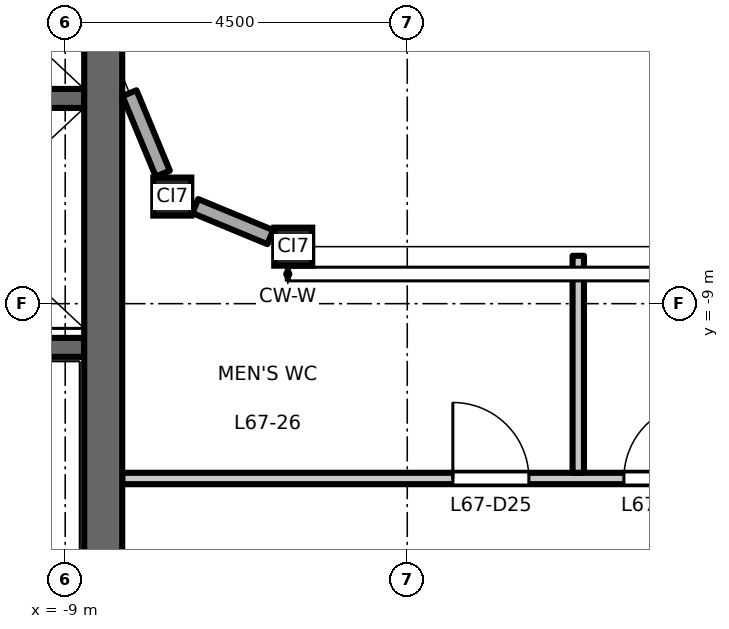
"""IFC4 building model, lengths in metres.
Left out: names, types, materials, properties, quantities, classifications, styles, units other than length and angle.
Written with IfcOpenShell. Run it as: python <this file> out.ifc"""

import sys

from ifc_helpers import new_model, si_unit, direction, frame, frame_2d, origin, origin_2d, place, context, subcontext, project, spatial, rectangle, hollow_rectangle, extrude, element, fill, save


model = new_model("IFC4")
c1 = context("Model", 3, precision=1e-05, world=origin(), true_north=direction((0.0, 1.0)))
c2 = subcontext(c1, "Body", "Model", "MODEL_VIEW")
j1 = project(units=[si_unit("LENGTHUNIT", "METRE"), si_unit("PLANEANGLEUNIT", "RADIAN")], contexts=[c1])
p1 = place(None, origin())
s1 = spatial("IfcSite", under=j1, at=p1, CompositionType="ELEMENT")
p2 = place(p1, origin())
s2 = spatial("IfcBuilding", under=s1, at=p2, CompositionType="ELEMENT")
p3 = place(p2, frame((0.0, 0.0, 312.2)))
s3 = spatial("IfcBuildingStorey", under=s2, at=p3, CompositionType="ELEMENT", Elevation=312.2)
for number, where, z_axis, x_axis in (
    (1, (-7.591, -7.591, 0.0), (0.0, 0.0, 1.0), (1.0, 0.0, 0.0)),
    (2, (-6.0, -8.25, 0.0), (0.0, 0.0, 1.0), (1.0, 0.0, 0.0)),
):
    element("IfcColumn", number, at=place(p3, frame(where, z_axis=z_axis, x_axis=x_axis)), inside=s3, PredefinedType="COLUMN", context=c2, shape_type="SweptSolid", body=[
        extrude(hollow_rectangle(XDim=0.5, YDim=0.5, WallThickness=0.025, at=origin_2d()), origin(), (0.0, 0.0, 1.0), 4.5),
    ])
p4 = place(p3, frame((-8.75, -6.3, 0.0), z_axis=(0.0, 0.0, 1.0), x_axis=(-1.0, 0.0, 0.0)))
e3 = element("IfcWall", 3, at=p4, inside=s3, PredefinedType="SHEAR", context=c2, shape_type="SweptSolid", body=[
    extrude(rectangle(XDim=3.1, YDim=0.25, at=frame_2d((1.55, 0.0))), origin(), (0.0, 0.0, 1.0), 4.35),
])
p5 = place(p3, frame((-8.75, -9.575, 0.0), z_axis=(0.0, 0.0, 1.0), x_axis=(-1.0, 0.0, 0.0)))
e4 = element("IfcWall", 4, at=p5, inside=s3, PredefinedType="SHEAR", context=c2, shape_type="SweptSolid", body=[
    extrude(rectangle(XDim=8.0, YDim=0.25, at=frame_2d((4.0, 0.0))), origin(), (0.0, 0.0, 1.0), 4.35),
])
p6 = place(p5, frame((6.65, 0.0, 0.0)))
e5 = element("IfcOpeningElement", 5, at=p6, cuts=e4, PredefinedType="OPENING", context=c2, shape_type="SweptSolid", body=[
    extrude(rectangle(XDim=1.1, YDim=2.1, at=frame_2d((0.55, 1.05))), frame((0.0, 0.135, 0.0), z_axis=(0.0, -1.0, 0.0), x_axis=(1.0, 0.0, 0.0)), (0.0, 0.0, 1.0), 0.27),
])
p7 = place(p3, frame((-8.5, -13.0, 0.0), z_axis=(0.0, 0.0, 1.0), x_axis=(0.0, 1.0, 0.0)))
e6 = element("IfcWall", 6, at=p7, inside=s3, PredefinedType="SHEAR", context=c2, shape_type="SweptSolid", body=[
    extrude(rectangle(XDim=26.0, YDim=0.5, at=frame_2d((13.0, 0.0))), origin(), (0.0, 0.0, 1.0), 4.35),
])
p8 = place(p3, frame((-8.154, -6.231, 0.0), z_axis=(0.0, 0.0, 1.0), x_axis=(0.382571404949, -0.923925927829, 0.0)))
e7 = element("IfcWall", 7, at=p8, inside=s3, PredefinedType="STANDARD", context=c2, shape_type="SweptSolid", body=[
    extrude(rectangle(XDim=1.146, YDim=0.2, at=frame_2d((0.573, 0.0))), origin(), (0.0, 0.0, 1.0), 4.01),
])
p9 = place(p3, frame((-7.289, -7.716, 0.0), z_axis=(0.0, 0.0, 1.0), x_axis=(0.923919409248, -0.382587147216, 0.0)))
e8 = element("IfcWall", 8, at=p9, inside=s3, PredefinedType="STANDARD", context=c2, shape_type="SweptSolid", body=[
    extrude(rectangle(XDim=1.069, YDim=0.2, at=frame_2d((0.534, 0.0))), origin(), (0.0, 0.0, 1.0), 4.01),
])
p10 = place(p3, frame((-8.25, -11.3, 0.0), z_axis=(0.0, 0.0, 1.0), x_axis=(1.0, 0.0, 0.0)))
e9 = element("IfcWall", 9, at=p10, inside=s3, PredefinedType="PARTITIONING", context=c2, shape_type="SweptSolid", body=[
    extrude(rectangle(XDim=14.79, YDim=0.15, at=frame_2d((7.395, 0.0))), origin(), (0.0, 0.0, 1.0), 4.35),
])
p11 = place(p10, frame((4.35, 0.0, 0.0)))
e10 = element("IfcOpeningElement", 10, at=p11, cuts=e9, PredefinedType="OPENING", context=c2, shape_type="SweptSolid", body=[
    extrude(rectangle(XDim=1.0, YDim=2.1, at=frame_2d((0.5, 1.05))), frame((0.0, 0.085, 0.0), z_axis=(0.0, -1.0, 0.0), x_axis=(1.0, 0.0, 0.0)), (0.0, 0.0, 1.0), 0.17),
])
p12 = place(p10, frame((6.6, 0.0, 0.0)))
e11 = element("IfcOpeningElement", 11, at=p12, cuts=e9, PredefinedType="OPENING", context=c2, shape_type="SweptSolid", body=[
    extrude(rectangle(XDim=1.0, YDim=2.1, at=frame_2d((0.5, 1.05))), frame((0.0, 0.085, 0.0), z_axis=(0.0, -1.0, 0.0), x_axis=(1.0, 0.0, 0.0)), (0.0, 0.0, 1.0), 0.17),
])
p13 = place(p10, frame((13.14, 0.0, 0.0)))
e12 = element("IfcOpeningElement", 12, at=p13, cuts=e9, PredefinedType="OPENING", context=c2, shape_type="SweptSolid", body=[
    extrude(rectangle(XDim=1.0, YDim=2.1, at=frame_2d((0.5, 1.05))), frame((0.0, 0.085, 0.0), z_axis=(0.0, -1.0, 0.0), x_axis=(1.0, 0.0, 0.0)), (0.0, 0.0, 1.0), 0.17),
])
p14 = place(p3, frame((-2.25, -11.225, 0.0), z_axis=(0.0, 0.0, 1.0), x_axis=(0.0, 1.0, 0.0)))
e13 = element("IfcWall", 13, at=p14, inside=s3, PredefinedType="PARTITIONING", context=c2, shape_type="SweptSolid", body=[
    extrude(rectangle(XDim=2.855, YDim=0.15, at=frame_2d((1.427, 0.0))), origin(), (0.0, 0.0, 1.0), 4.35),
])
p15 = place(p11, origin())
e14 = element("IfcDoor", 14, at=p15, inside=s3, OperationType="SINGLE_SWING_LEFT", PredefinedType="DOOR", context=c2, shape_type="SweptSolid", body=[
    extrude(rectangle(XDim=1.0, YDim=2.1, at=frame_2d((0.5, 1.05))), frame((0.0, 0.025, 0.0), z_axis=(0.0, -1.0, 0.0), x_axis=(1.0, 0.0, 0.0)), (0.0, 0.0, 1.0), 0.05),
])
fill(e10, e14)
p16 = place(p12, origin())
e15 = element("IfcDoor", 15, at=p16, inside=s3, OperationType="SINGLE_SWING_RIGHT", PredefinedType="DOOR", context=c2, shape_type="SweptSolid", body=[
    extrude(rectangle(XDim=1.0, YDim=2.1, at=frame_2d((0.5, 1.05))), frame((0.0, 0.025, 0.0), z_axis=(0.0, -1.0, 0.0), x_axis=(1.0, 0.0, 0.0)), (0.0, 0.0, 1.0), 0.05),
])
fill(e11, e15)
save(model, sys.argv[1])
